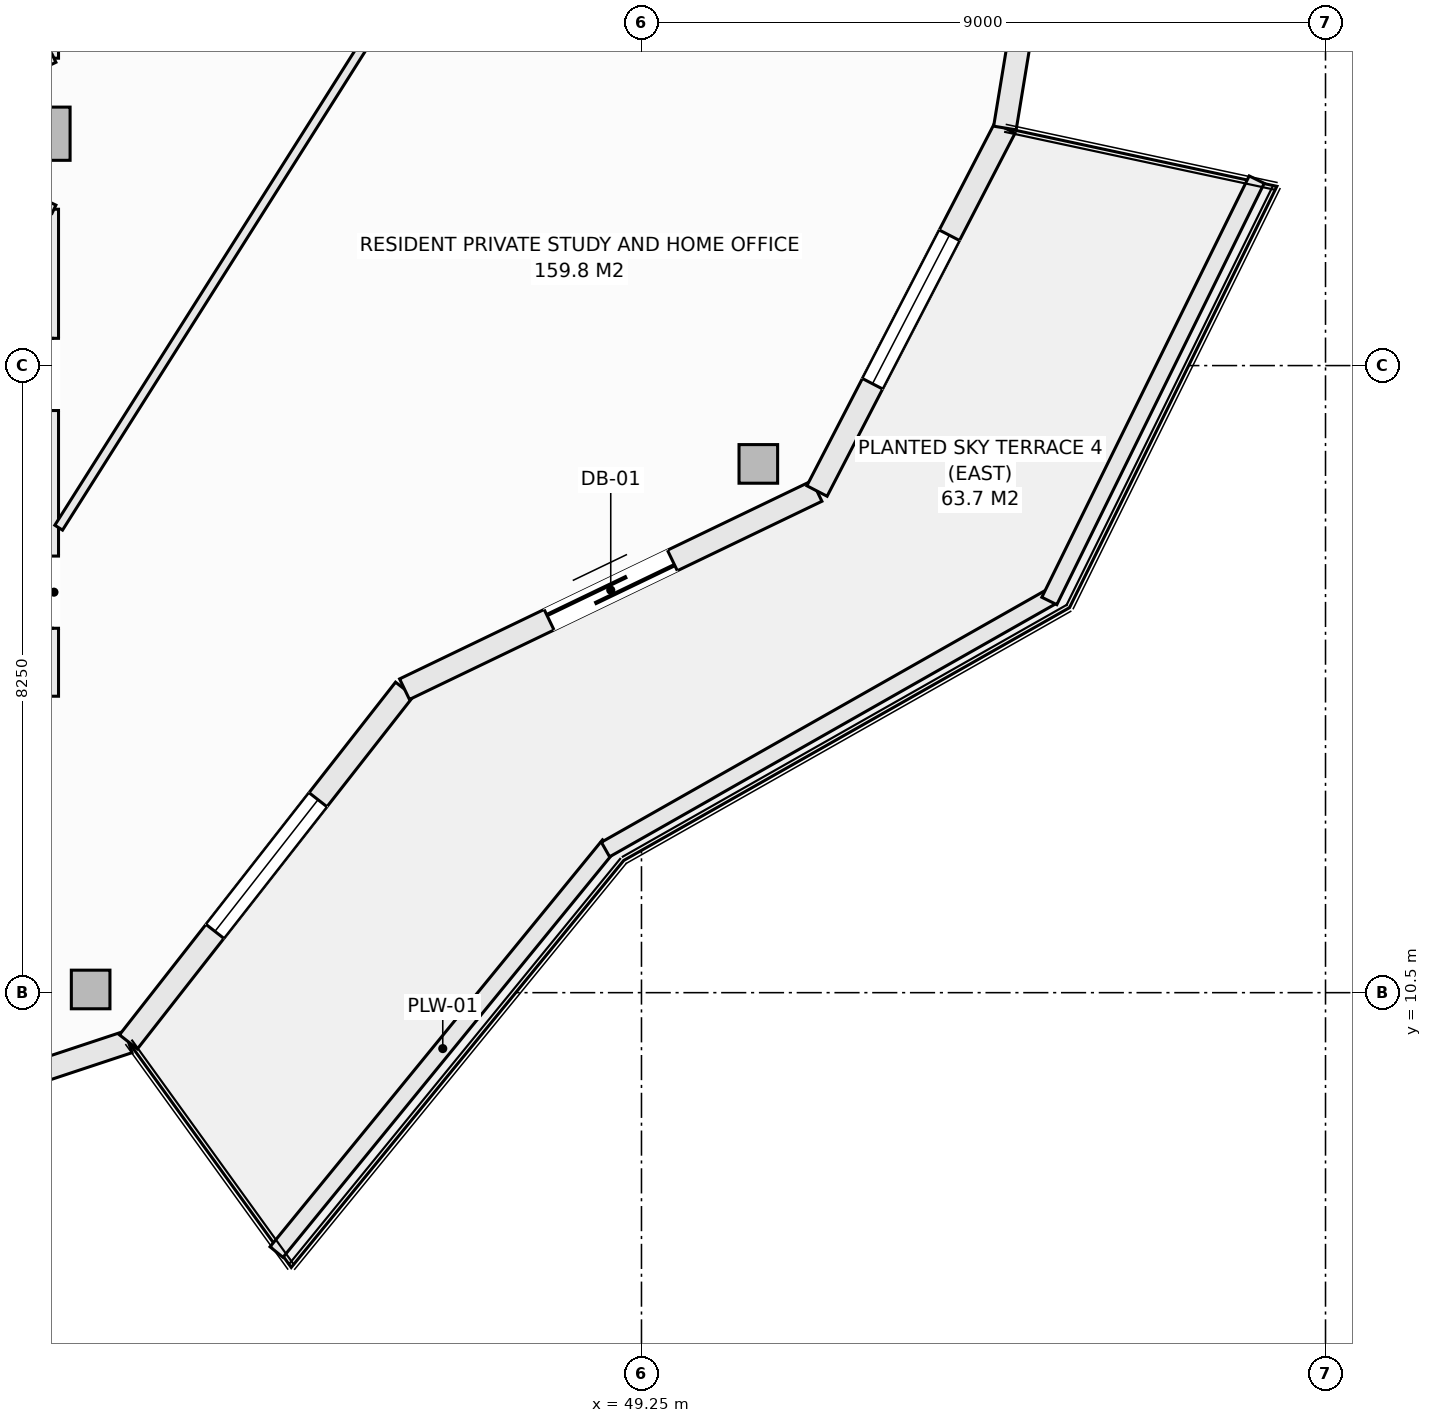
"""IFC4 building model, lengths in metres.
Left out: names, types, materials, properties, quantities, classifications, styles, units other than length and angle.
Written with IfcOpenShell. Run it as: python <this file> out.ifc"""

import sys

from ifc_helpers import new_model, si_unit, direction, frame, frame_2d, origin, origin_2d, place, context, subcontext, project, spatial, rectangle, hollow_rectangle, extrude, element, fill, save


model = new_model("IFC4")
c1 = context("Model", 3, precision=1e-05, world=origin(), true_north=direction((0.0, 1.0)))
c2 = subcontext(c1, "Body", "Model", "MODEL_VIEW")
j1 = project(units=[si_unit("LENGTHUNIT", "METRE"), si_unit("PLANEANGLEUNIT", "RADIAN")], contexts=[c1])
p1 = place(None, origin())
s1 = spatial("IfcSite", under=j1, at=p1, CompositionType="ELEMENT")
p2 = place(p1, origin())
s2 = spatial("IfcBuilding", under=s1, at=p2, CompositionType="ELEMENT")
p3 = place(p2, frame((0.0, 0.0, 206.3)))
s3 = spatial("IfcBuildingStorey", under=s2, at=p3, CompositionType="ELEMENT", Elevation=206.3)
for number, where, z_axis, x_axis in (
    (1, (42.003, 10.542, -0.27), (0.0, 0.0, 1.0), (1.0, 0.0, 0.0)),
    (2, (50.787, 17.456, -0.27), (0.0, 0.0, 1.0), (1.0, 0.0, 0.0)),
):
    element("IfcColumn", number, at=place(p3, frame(where, z_axis=z_axis, x_axis=x_axis)), inside=s3, PredefinedType="COLUMN", context=c2, shape_type="SweptSolid", body=[
        extrude(hollow_rectangle(XDim=0.508, YDim=0.508, WallThickness=0.019, at=origin_2d()), origin(), (0.0, 0.0, 1.0), 3.3),
    ])
p4 = place(p3, frame((41.382, 21.801, -0.27), z_axis=(0.0, 0.0, 1.0), x_axis=(1.0, 0.0, 0.0)))
e3 = element("IfcColumn", 3, at=p4, inside=s3, PredefinedType="COLUMN", context=c2, shape_type="SweptSolid", body=[
    extrude(rectangle(XDim=0.7, YDim=0.7, at=origin_2d()), origin(), (0.0, 0.0, 1.0), 3.3),
])
p5 = place(p3, frame((36.531, 7.875, 0.0), z_axis=(0.0, 0.0, 1.0), x_axis=(0.949240877604, 0.314550085495, 0.0)))
e4 = element("IfcWall", 4, at=p5, inside=s3, PredefinedType="SOLIDWALL", context=c2, shape_type="SweptSolid", body=[
    extrude(rectangle(XDim=6.288, YDim=0.3, at=frame_2d((3.144, 0.0))), origin(), (0.0, 0.0, 1.0), 2.605),
])
p6 = place(p5, frame((2.044, 0.0, 0.72)))
e5 = element("IfcOpeningElement", 5, at=p6, cuts=e4, PredefinedType="OPENING", context=c2, shape_type="SweptSolid", body=[
    extrude(rectangle(XDim=2.2, YDim=1.65, at=frame_2d((1.1, 0.825))), frame((0.0, 0.16, 0.0), z_axis=(0.0, -1.0, 0.0), x_axis=(1.0, 0.0, 0.0)), (0.0, 0.0, 1.0), 0.32),
])
p7 = place(p3, frame((42.5, 9.853, 0.0), z_axis=(0.0, 0.0, 1.0), x_axis=(0.616450126935, 0.787393955401, 0.0)))
e6 = element("IfcWall", 6, at=p7, inside=s3, PredefinedType="SOLIDWALL", context=c2, shape_type="SweptSolid", body=[
    extrude(rectangle(XDim=5.893, YDim=0.3, at=frame_2d((2.946, 0.0))), origin(), (0.0, 0.0, 1.0), 2.605),
])
p8 = place(p7, frame((1.846, 0.0, 0.72)))
e7 = element("IfcOpeningElement", 7, at=p8, cuts=e6, PredefinedType="OPENING", context=c2, shape_type="SweptSolid", body=[
    extrude(rectangle(XDim=2.2, YDim=1.65, at=frame_2d((1.1, 0.825))), frame((0.0, 0.16, 0.0), z_axis=(0.0, -1.0, 0.0), x_axis=(1.0, 0.0, 0.0)), (0.0, 0.0, 1.0), 0.32),
])
p9 = place(p3, frame((46.133, 14.493, 0.0), z_axis=(0.0, 0.0, 1.0), x_axis=(0.901348331142, 0.433094892545, 0.0)))
e8 = element("IfcWall", 8, at=p9, inside=s3, PredefinedType="SOLIDWALL", context=c2, shape_type="SweptSolid", body=[
    extrude(rectangle(XDim=6.021, YDim=0.3, at=frame_2d((3.01, 0.0))), origin(), (0.0, 0.0, 1.0), 2.605),
])
p10 = place(p9, frame((2.11, 0.0, 0.0)))
e9 = element("IfcOpeningElement", 9, at=p10, cuts=e8, PredefinedType="OPENING", context=c2, shape_type="SweptSolid", body=[
    extrude(rectangle(XDim=1.8, YDim=2.25, at=frame_2d((0.9, 1.125))), frame((0.0, 0.16, 0.0), z_axis=(0.0, -1.0, 0.0), x_axis=(1.0, 0.0, 0.0)), (0.0, 0.0, 1.0), 0.32),
])
p11 = place(p3, frame((51.559, 17.1, 0.0), z_axis=(0.0, 0.0, 1.0), x_axis=(0.459808219482, 0.888018243786, 0.0)))
e10 = element("IfcWall", 10, at=p11, inside=s3, PredefinedType="SOLIDWALL", context=c2, shape_type="SweptSolid", body=[
    extrude(rectangle(XDim=5.378, YDim=0.3, at=frame_2d((2.689, 0.0))), origin(), (0.0, 0.0, 1.0), 2.605),
])
p12 = place(p11, frame((1.589, 0.0, 0.72)))
e11 = element("IfcOpeningElement", 11, at=p12, cuts=e10, PredefinedType="OPENING", context=c2, shape_type="SweptSolid", body=[
    extrude(rectangle(XDim=2.2, YDim=1.65, at=frame_2d((1.1, 0.825))), frame((0.0, 0.16, 0.0), z_axis=(0.0, -1.0, 0.0), x_axis=(1.0, 0.0, 0.0)), (0.0, 0.0, 1.0), 0.32),
])
p13 = place(p3, frame((54.032, 21.875, 0.0), z_axis=(0.0, 0.0, 1.0), x_axis=(0.16237087798, 0.986729799886, 0.0)))
e12 = element("IfcWall", 12, at=p13, inside=s3, PredefinedType="SOLIDWALL", context=c2, shape_type="SweptSolid", body=[
    extrude(rectangle(XDim=5.193, YDim=0.3, at=frame_2d((2.597, 0.0))), origin(), (0.0, 0.0, 1.0), 2.605),
])
p14 = place(p13, frame((1.497, 0.0, 0.72)))
e13 = element("IfcOpeningElement", 13, at=p14, cuts=e12, PredefinedType="OPENING", context=c2, shape_type="SweptSolid", body=[
    extrude(rectangle(XDim=2.2, YDim=1.65, at=frame_2d((1.1, 0.825))), frame((0.0, 0.16, 0.0), z_axis=(0.0, -1.0, 0.0), x_axis=(1.0, 0.0, 0.0)), (0.0, 0.0, 1.0), 0.32),
])
p15 = place(p3, frame((44.448, 7.087, 0.0), z_axis=(0.0, 0.0, 1.0), x_axis=(0.632697312147, 0.774399193699, 0.0)))
e14 = element("IfcWall", 14, at=p15, inside=s3, PredefinedType="PARAPET", context=c2, shape_type="SweptSolid", body=[
    extrude(rectangle(XDim=6.914, YDim=0.22, at=frame_2d((3.457, 0.0))), origin(), (0.0, 0.0, 1.0), 0.52),
])
p16 = place(p3, frame((48.776, 12.383, 0.0), z_axis=(0.0, 0.0, 1.0), x_axis=(0.869860619267, 0.493297580623, 0.0)))
e15 = element("IfcWall", 15, at=p16, inside=s3, PredefinedType="PARAPET", context=c2, shape_type="SweptSolid", body=[
    extrude(rectangle(XDim=6.743, YDim=0.22, at=frame_2d((3.371, 0.0))), origin(), (0.0, 0.0, 1.0), 0.52),
])
p17 = place(p3, frame((54.616, 15.653, 0.0), z_axis=(0.0, 0.0, 1.0), x_axis=(0.441640961804, 0.897191875162, 0.0)))
e16 = element("IfcWall", 16, at=p17, inside=s3, PredefinedType="PARAPET", context=c2, shape_type="SweptSolid", body=[
    extrude(rectangle(XDim=6.178, YDim=0.22, at=frame_2d((3.089, 0.0))), origin(), (0.0, 0.0, 1.0), 0.52),
])
p18 = place(p3, frame((41.52, 14.4, 0.0), z_axis=(0.0, 0.0, 1.0), x_axis=(0.0, 1.0, 0.0)))
e17 = element("IfcWall", 17, at=p18, inside=s3, PredefinedType="PARTITIONING", context=c2, shape_type="SweptSolid", body=[
    extrude(rectangle(XDim=6.407, YDim=0.12, at=frame_2d((3.204, 0.0))), origin(), (0.0, 0.0, 1.0), 3.03),
])
p19 = place(p18, frame((0.894, 0.0, 0.0)))
e18 = element("IfcOpeningElement", 18, at=p19, cuts=e17, PredefinedType="OPENING", context=c2, shape_type="SweptSolid", body=[
    extrude(rectangle(XDim=0.95, YDim=2.1, at=frame_2d((0.475, 1.05))), frame((0.0, 0.07, 0.0), z_axis=(0.0, -1.0, 0.0), x_axis=(1.0, 0.0, 0.0)), (0.0, 0.0, 1.0), 0.14),
])
p20 = place(p18, frame((3.759, 0.0, 0.0)))
e19 = element("IfcOpeningElement", 19, at=p20, cuts=e17, PredefinedType="OPENING", context=c2, shape_type="SweptSolid", body=[
    extrude(rectangle(XDim=0.95, YDim=2.1, at=frame_2d((0.475, 1.05))), frame((0.0, 0.07, 0.0), z_axis=(0.0, -1.0, 0.0), x_axis=(1.0, 0.0, 0.0)), (0.0, 0.0, 1.0), 0.14),
])
p21 = place(p3, frame((41.52, 22.794, 0.0), z_axis=(0.0, 0.0, 1.0), x_axis=(0.0, 1.0, 0.0)))
e20 = element("IfcWall", 20, at=p21, inside=s3, PredefinedType="PARTITIONING", context=c2, shape_type="SweptSolid", body=[
    extrude(rectangle(XDim=4.654, YDim=0.12, at=frame_2d((2.327, 0.0))), origin(), (0.0, 0.0, 1.0), 2.478),
])
for number, where, z_axis, x_axis in (
    (21, (40.986, 22.541, 0.0), (0.0, 0.0, 1.0), (0.904, 0.428, 0.0)),
    (22, (40.986, 21.06, 0.0), (0.0, 0.0, 1.0), (0.904, -0.428, 0.0)),
):
    element("IfcWall", number, at=place(p3, frame(where, z_axis=z_axis, x_axis=x_axis)), inside=s3, PredefinedType="PARTITIONING", context=c2, shape_type="SweptSolid", body=[
        extrude(rectangle(XDim=0.591, YDim=0.12, at=frame_2d((0.295, 0.0))), origin(), (0.0, 0.0, 1.0), 3.03),
    ])
p22 = place(p3, frame((41.582, 16.617, 0.0), z_axis=(0.0, 0.0, 1.0), x_axis=(0.534374121444, 0.845248069108, 0.0)))
e23 = element("IfcWall", 23, at=p22, inside=s3, PredefinedType="PARTITIONING", context=c2, shape_type="SweptSolid", body=[
    extrude(rectangle(XDim=20.892, YDim=0.12, at=frame_2d((10.446, 0.0))), origin(), (0.0, 0.0, 1.0), 3.03),
])
p23 = place(p8, origin())
e24 = element("IfcWindow", 24, at=p23, inside=s3, PartitioningType="SINGLE_PANEL", PredefinedType="WINDOW", context=c2, shape_type="SweptSolid", body=[
    extrude(rectangle(XDim=2.2, YDim=1.65, at=frame_2d((1.1, 0.825))), frame((0.0, 0.03, 0.0), z_axis=(0.0, -1.0, 0.0), x_axis=(1.0, 0.0, 0.0)), (0.0, 0.0, 1.0), 0.06),
])
fill(e7, e24)
p24 = place(p10, frame((1.8, 0.0, 0.0), z_axis=(0.0, 0.0, 1.0), x_axis=(-1.0, 0.0, 0.0)))
e25 = element("IfcDoor", 25, at=p24, inside=s3, OperationType="SLIDING_TO_LEFT", PredefinedType="DOOR", context=c2, shape_type="SweptSolid", body=[
    extrude(rectangle(XDim=1.8, YDim=2.25, at=frame_2d((0.9, 1.125))), frame((0.0, 0.025, 0.0), z_axis=(0.0, -1.0, 0.0), x_axis=(1.0, 0.0, 0.0)), (0.0, 0.0, 1.0), 0.05),
])
fill(e9, e25)
p25 = place(p12, origin())
e26 = element("IfcWindow", 26, at=p25, inside=s3, PartitioningType="SINGLE_PANEL", PredefinedType="WINDOW", context=c2, shape_type="SweptSolid", body=[
    extrude(rectangle(XDim=2.2, YDim=1.65, at=frame_2d((1.1, 0.825))), frame((0.0, 0.03, 0.0), z_axis=(0.0, -1.0, 0.0), x_axis=(1.0, 0.0, 0.0)), (0.0, 0.0, 1.0), 0.06),
])
fill(e11, e26)
p26 = place(p19, origin())
e27 = element("IfcDoor", 27, at=p26, inside=s3, OperationType="SINGLE_SWING_LEFT", PredefinedType="DOOR", context=c2, shape_type="SweptSolid", body=[
    extrude(rectangle(XDim=0.95, YDim=2.1, at=frame_2d((0.475, 1.05))), frame((0.0, 0.025, 0.0), z_axis=(0.0, -1.0, 0.0), x_axis=(1.0, 0.0, 0.0)), (0.0, 0.0, 1.0), 0.05),
])
fill(e18, e27)
p27 = place(p20, origin())
e28 = element("IfcDoor", 28, at=p27, inside=s3, OperationType="SINGLE_SWING_RIGHT", PredefinedType="DOOR", context=c2, shape_type="SweptSolid", body=[
    extrude(rectangle(XDim=0.95, YDim=2.1, at=frame_2d((0.475, 1.05))), frame((0.0, 0.025, 0.0), z_axis=(0.0, -1.0, 0.0), x_axis=(1.0, 0.0, 0.0)), (0.0, 0.0, 1.0), 0.05),
])
fill(e19, e28)
save(model, sys.argv[1])
